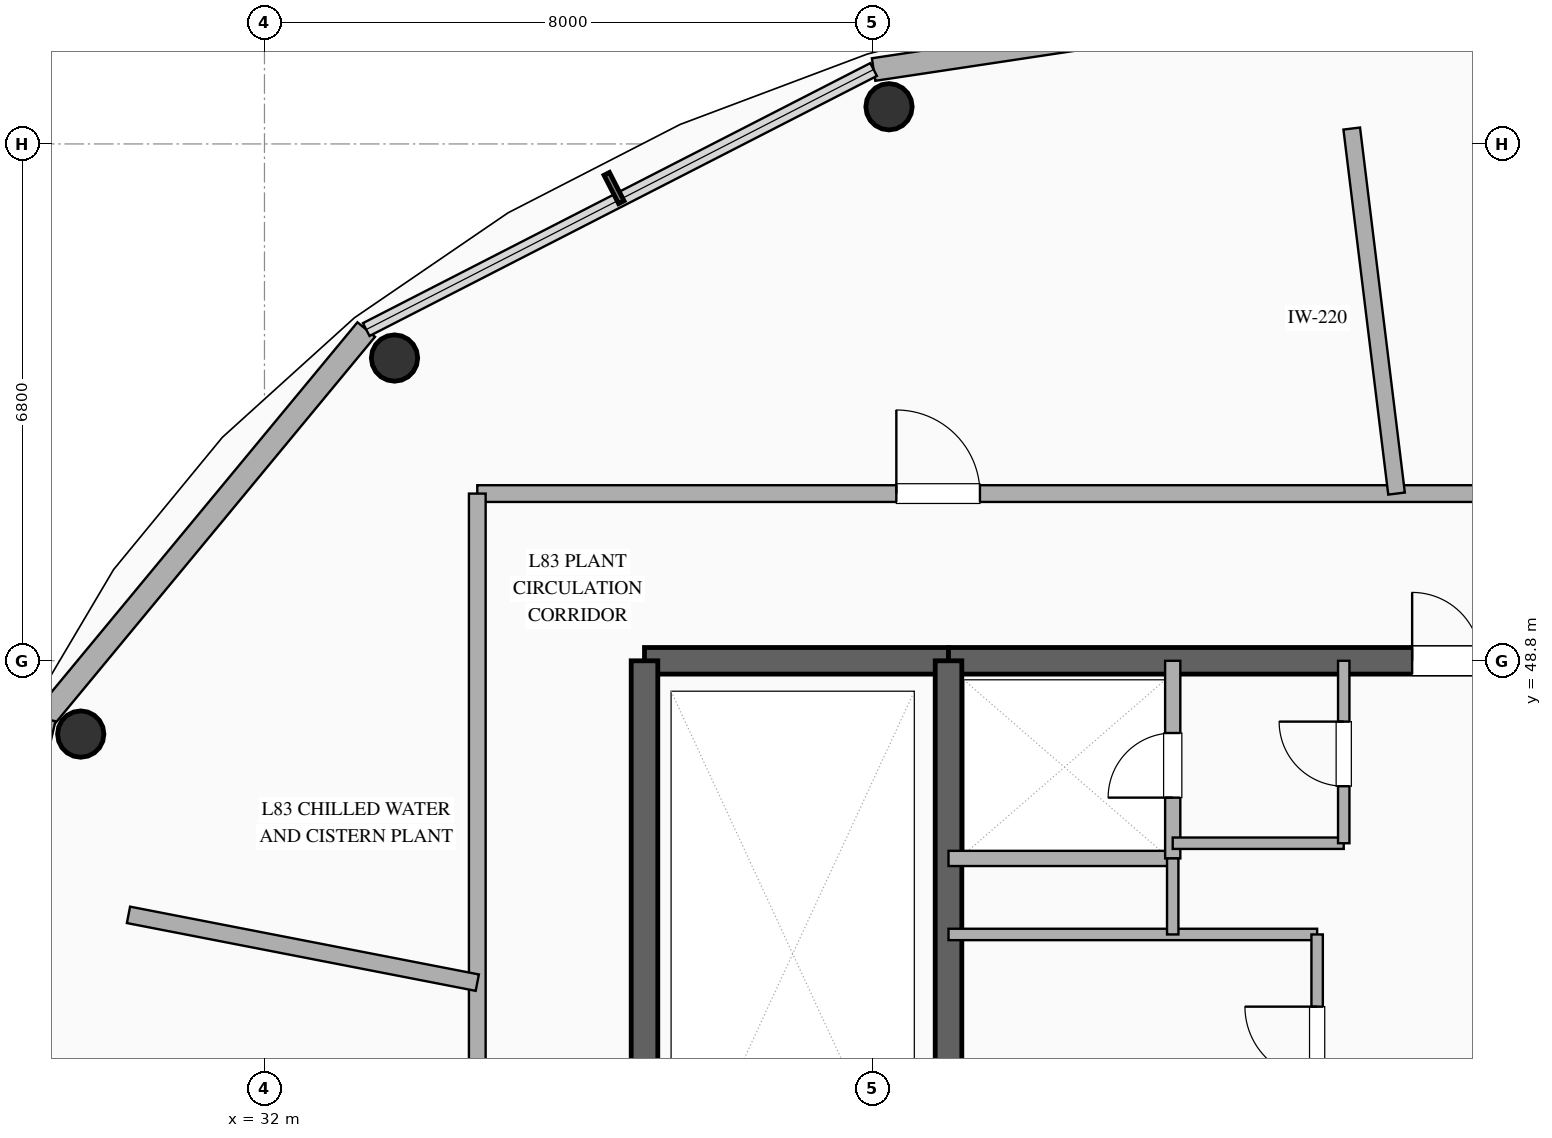
"""IFC4 building model, lengths in metres.
Left out: names, types, materials, properties, quantities, classifications, styles, units other than length and angle.
Written with IfcOpenShell. Run it as: python <this file> out.ifc"""

import sys

from ifc_helpers import new_model, si_unit, direction, frame, frame_2d, origin, origin_2d, place, context, subcontext, project, spatial, rectangle, hollow_circle, extrude, element, fill, save


model = new_model("IFC4")
c1 = context("Model", 3, precision=1e-05, world=origin(), true_north=direction((0.0, 1.0)))
c2 = subcontext(c1, "Body", "Model", "MODEL_VIEW")
j1 = project(units=[si_unit("LENGTHUNIT", "METRE"), si_unit("PLANEANGLEUNIT", "RADIAN")], contexts=[c1])
p1 = place(None, origin())
s1 = spatial("IfcSite", under=j1, at=p1, CompositionType="ELEMENT")
p2 = place(p1, origin())
s2 = spatial("IfcBuilding", under=s1, at=p2, CompositionType="ELEMENT")
p3 = place(p2, frame((0.0, 0.0, 321.6)))
s3 = spatial("IfcBuildingStorey", under=s2, at=p3, CompositionType="ELEMENT", Elevation=321.6)
p4 = place(p3, frame((37.0, 48.8, 0.0), z_axis=(0.0, 0.0, 1.0), x_axis=(1.0, 0.0, 0.0)))
e1 = element("IfcWall", 1, at=p4, inside=s3, PredefinedType="SHEAR", context=c2, shape_type="SweptSolid", body=[
    extrude(rectangle(XDim=4.0, YDim=0.35, at=frame_2d((2.0, 0.0))), origin(), (0.0, 0.0, 1.0), 5.14),
])
p5 = place(p3, frame((41.0, 48.8, 0.0), z_axis=(0.0, 0.0, 1.0), x_axis=(1.0, 0.0, 0.0)))
e2 = element("IfcWall", 2, at=p5, inside=s3, PredefinedType="SHEAR", context=c2, shape_type="SweptSolid", body=[
    extrude(rectangle(XDim=14.0, YDim=0.35, at=frame_2d((7.0, 0.0))), origin(), (0.0, 0.0, 1.0), 5.14),
])
p6 = place(p5, frame((6.1, 0.0, 0.0)))
e3 = element("IfcOpeningElement", 3, at=p6, cuts=e2, PredefinedType="OPENING", context=c2, shape_type="SweptSolid", body=[
    extrude(rectangle(XDim=1.8, YDim=2.25, at=frame_2d((0.9, 1.125))), frame((0.0, 0.185, 0.0), z_axis=(0.0, -1.0, 0.0), x_axis=(1.0, 0.0, 0.0)), (0.0, 0.0, 1.0), 0.37),
])
p7 = place(p3, frame((37.0, 35.2, 0.0), z_axis=(0.0, 0.0, 1.0), x_axis=(0.0, 1.0, 0.0)))
e4 = element("IfcWall", 4, at=p7, inside=s3, PredefinedType="SHEAR", context=c2, shape_type="SweptSolid", body=[
    extrude(rectangle(XDim=13.6, YDim=0.35, at=frame_2d((6.8, 0.0))), origin(), (0.0, 0.0, 1.0), 5.14),
])
p8 = place(p7, frame((1.5, 0.0, 0.0)))
e5 = element("IfcOpeningElement", 5, at=p8, cuts=e4, PredefinedType="OPENING", context=c2, shape_type="SweptSolid", body=[
    extrude(rectangle(XDim=1.2, YDim=2.15, at=frame_2d((0.6, 1.075))), frame((0.0, 0.185, 0.0), z_axis=(0.0, -1.0, 0.0), x_axis=(1.0, 0.0, 0.0)), (0.0, 0.0, 1.0), 0.37),
])
p9 = place(p3, frame((41.0, 35.2, 0.0), z_axis=(0.0, 0.0, 1.0), x_axis=(0.0, 1.0, 0.0)))
e6 = element("IfcWall", 6, at=p9, inside=s3, PredefinedType="SHEAR", context=c2, shape_type="SweptSolid", body=[
    extrude(rectangle(XDim=13.6, YDim=0.35, at=frame_2d((6.8, 0.0))), origin(), (0.0, 0.0, 1.0), 5.14),
])
p10 = place(p9, frame((1.15, 0.0, 0.0)))
e7 = element("IfcOpeningElement", 7, at=p10, cuts=e6, PredefinedType="OPENING", context=c2, shape_type="SweptSolid", body=[
    extrude(rectangle(XDim=1.1, YDim=2.2, at=frame_2d((0.55, 1.1))), frame((0.0, 0.185, 0.0), z_axis=(0.0, -1.0, 0.0), x_axis=(1.0, 0.0, 0.0)), (0.0, 0.0, 1.0), 0.37),
])
for number, where, z_axis, x_axis in (
    (8, (40.217, 56.089, 0.0), (0.0, 0.0, 1.0), (1.0, 0.0, 0.0)),
    (9, (33.711, 52.783, 0.0), (0.0, 0.0, 1.0), (1.0, 0.0, 0.0)),
    (10, (29.583, 47.836, 0.0), (0.0, 0.0, 1.0), (1.0, 0.0, 0.0)),
):
    element("IfcColumn", number, at=place(p3, frame(where, z_axis=z_axis, x_axis=x_axis)), inside=s3, PredefinedType="COLUMN", context=c2, shape_type="SweptSolid", body=[
        extrude(hollow_circle(Radius=0.305, WallThickness=0.02, at=origin_2d()), origin(), (0.0, 0.0, 1.0), 5.14),
    ])
p11 = place(p3, frame((48.0, 57.78, 0.0), z_axis=(0.0, 0.0, 1.0), x_axis=(-0.988875731541, -0.148744033727, 0.0)))
e11 = element("IfcWall", 11, at=p11, inside=s3, PredefinedType="SOLIDWALL", context=c2, shape_type="SweptSolid", body=[
    extrude(rectangle(XDim=8.075, YDim=0.3, at=frame_2d((4.038, 0.0))), origin(), (0.0, 0.0, 1.0), 5.14),
])
p12 = place(p3, frame((33.339, 53.158, 0.0), z_axis=(0.0, 0.0, 1.0), x_axis=(-0.637488001771, -0.770460282947, 0.0)))
e12 = element("IfcWall", 12, at=p12, inside=s3, PredefinedType="SOLIDWALL", context=c2, shape_type="SweptSolid", body=[
    extrude(rectangle(XDim=6.645, YDim=0.3, at=frame_2d((3.322, 0.0))), origin(), (0.0, 0.0, 1.0), 5.14),
])
p13 = place(p3, frame((29.103, 48.039, 0.0), z_axis=(0.0, 0.0, 1.0), x_axis=(-0.225604460723, -0.974218983238, 0.0)))
e13 = element("IfcWall", 13, at=p13, inside=s3, PredefinedType="SOLIDWALL", context=c2, shape_type="SweptSolid", body=[
    extrude(rectangle(XDim=6.199, YDim=0.3, at=frame_2d((3.099, 0.0))), origin(), (0.0, 0.0, 1.0), 5.14),
])
p14 = place(p3, frame((41.0, 46.2, 0.0), z_axis=(0.0, 0.0, 1.0), x_axis=(1.0, 0.0, 0.0)))
e14 = element("IfcWall", 14, at=p14, inside=s3, PredefinedType="SOLIDWALL", context=c2, shape_type="SweptSolid", body=[
    extrude(rectangle(XDim=2.95, YDim=0.2, at=frame_2d((1.475, 0.0))), origin(), (0.0, 0.0, 1.0), 3.74),
])
p15 = place(p3, frame((43.95, 46.2, 0.0), z_axis=(0.0, 0.0, 1.0), x_axis=(0.0, 1.0, 0.0)))
e15 = element("IfcWall", 15, at=p15, inside=s3, PredefinedType="SOLIDWALL", context=c2, shape_type="SweptSolid", body=[
    extrude(rectangle(XDim=2.6, YDim=0.2, at=frame_2d((1.3, 0.0))), origin(), (0.0, 0.0, 1.0), 3.74),
])
p16 = place(p15, frame((0.8, 0.0, 0.0)))
e16 = element("IfcOpeningElement", 16, at=p16, cuts=e15, PredefinedType="OPENING", context=c2, shape_type="SweptSolid", body=[
    extrude(rectangle(XDim=0.85, YDim=2.15, at=frame_2d((0.425, 1.075))), frame((0.0, 0.11, 0.0), z_axis=(0.0, -1.0, 0.0), x_axis=(1.0, 0.0, 0.0)), (0.0, 0.0, 1.0), 0.22),
])
p17 = place(p3, frame((41.0, 45.2, 0.0), z_axis=(0.0, 0.0, 1.0), x_axis=(1.0, 0.0, 0.0)))
e17 = element("IfcWall", 17, at=p17, inside=s3, PredefinedType="PARTITIONING", context=c2, shape_type="SweptSolid", body=[
    extrude(rectangle(XDim=4.85, YDim=0.15, at=frame_2d((2.425, 0.0))), origin(), (0.0, 0.0, 1.0), 3.74),
])
p18 = place(p3, frame((43.95, 45.2, 0.0), z_axis=(0.0, 0.0, 1.0), x_axis=(0.0, 1.0, 0.0)))
e18 = element("IfcWall", 18, at=p18, inside=s3, PredefinedType="PARTITIONING", context=c2, shape_type="SweptSolid", body=[
    extrude(rectangle(XDim=1.0, YDim=0.15, at=frame_2d((0.5, 0.0))), origin(), (0.0, 0.0, 1.0), 3.74),
])
p19 = place(p3, frame((45.85, 42.4, 0.0), z_axis=(0.0, 0.0, 1.0), x_axis=(0.0, 1.0, 0.0)))
e19 = element("IfcWall", 19, at=p19, inside=s3, PredefinedType="PARTITIONING", context=c2, shape_type="SweptSolid", body=[
    extrude(rectangle(XDim=2.8, YDim=0.15, at=frame_2d((1.4, 0.0))), origin(), (0.0, 0.0, 1.0), 3.74),
])
p20 = place(p19, frame((0.9, 0.0, 0.0)))
e20 = element("IfcOpeningElement", 20, at=p20, cuts=e19, PredefinedType="OPENING", context=c2, shape_type="SweptSolid", body=[
    extrude(rectangle(XDim=0.95, YDim=2.15, at=frame_2d((0.475, 1.075))), frame((0.0, 0.085, 0.0), z_axis=(0.0, -1.0, 0.0), x_axis=(1.0, 0.0, 0.0)), (0.0, 0.0, 1.0), 0.17),
])
p21 = place(p3, frame((43.95, 46.4, 0.0), z_axis=(0.0, 0.0, 1.0), x_axis=(1.0, 0.0, 0.0)))
e21 = element("IfcWall", 21, at=p21, inside=s3, PredefinedType="PARTITIONING", context=c2, shape_type="SweptSolid", body=[
    extrude(rectangle(XDim=2.25, YDim=0.15, at=frame_2d((1.125, 0.0))), origin(), (0.0, 0.0, 1.0), 3.74),
])
p22 = place(p3, frame((46.2, 46.4, 0.0), z_axis=(0.0, 0.0, 1.0), x_axis=(0.0, 1.0, 0.0)))
e22 = element("IfcWall", 22, at=p22, inside=s3, PredefinedType="PARTITIONING", context=c2, shape_type="SweptSolid", body=[
    extrude(rectangle(XDim=2.4, YDim=0.15, at=frame_2d((1.2, 0.0))), origin(), (0.0, 0.0, 1.0), 3.74),
])
p23 = place(p22, frame((0.75, 0.0, 0.0)))
e23 = element("IfcOpeningElement", 23, at=p23, cuts=e22, PredefinedType="OPENING", context=c2, shape_type="SweptSolid", body=[
    extrude(rectangle(XDim=0.85, YDim=2.15, at=frame_2d((0.425, 1.075))), frame((0.0, 0.085, 0.0), z_axis=(0.0, -1.0, 0.0), x_axis=(1.0, 0.0, 0.0)), (0.0, 0.0, 1.0), 0.17),
])
p24 = place(p3, frame((34.8, 51.0, 0.0), z_axis=(0.0, 0.0, 1.0), x_axis=(1.0, 0.0, 0.0)))
e24 = element("IfcWall", 24, at=p24, inside=s3, PredefinedType="SOLIDWALL", context=c2, shape_type="SweptSolid", body=[
    extrude(rectangle(XDim=26.4, YDim=0.22, at=frame_2d((13.2, 0.0))), origin(), (0.0, 0.0, 1.0), 3.74),
])
p25 = place(p24, frame((18.681, 0.0, 0.0)))
e25 = element("IfcOpeningElement", 25, at=p25, cuts=e24, PredefinedType="OPENING", context=c2, shape_type="SweptSolid", body=[
    extrude(rectangle(XDim=1.1, YDim=2.15, at=frame_2d((0.55, 1.075))), frame((0.0, 0.12, 0.0), z_axis=(0.0, -1.0, 0.0), x_axis=(1.0, 0.0, 0.0)), (0.0, 0.0, 1.0), 0.24),
])
p26 = place(p24, frame((5.514, 0.0, 0.0)))
e26 = element("IfcOpeningElement", 26, at=p26, cuts=e24, PredefinedType="OPENING", context=c2, shape_type="SweptSolid", body=[
    extrude(rectangle(XDim=1.1, YDim=2.15, at=frame_2d((0.55, 1.075))), frame((0.0, 0.12, 0.0), z_axis=(0.0, -1.0, 0.0), x_axis=(1.0, 0.0, 0.0)), (0.0, 0.0, 1.0), 0.24),
])
p27 = place(p3, frame((34.8, 33.0, 0.0), z_axis=(0.0, 0.0, 1.0), x_axis=(0.0, 1.0, 0.0)))
e27 = element("IfcWall", 27, at=p27, inside=s3, PredefinedType="SOLIDWALL", context=c2, shape_type="SweptSolid", body=[
    extrude(rectangle(XDim=18.0, YDim=0.22, at=frame_2d((9.0, 0.0))), origin(), (0.0, 0.0, 1.0), 3.74),
])
p28 = place(p27, frame((5.249, 0.0, 0.0)))
e28 = element("IfcOpeningElement", 28, at=p28, cuts=e27, PredefinedType="OPENING", context=c2, shape_type="SweptSolid", body=[
    extrude(rectangle(XDim=1.1, YDim=2.15, at=frame_2d((0.55, 1.075))), frame((0.0, 0.12, 0.0), z_axis=(0.0, -1.0, 0.0), x_axis=(1.0, 0.0, 0.0)), (0.0, 0.0, 1.0), 0.24),
])
p29 = place(p3, frame((46.895, 51.0, 0.0), z_axis=(0.0, 0.0, 1.0), x_axis=(-0.121854674678, 0.992547952625, 0.0)))
e29 = element("IfcWall", 29, at=p29, inside=s3, PredefinedType="SOLIDWALL", context=c2, shape_type="SweptSolid", body=[
    extrude(rectangle(XDim=4.839, YDim=0.22, at=frame_2d((2.419, 0.0))), origin(), (0.0, 0.0, 1.0), 3.74),
])
p30 = place(p3, frame((34.8, 44.566, 0.0), z_axis=(0.0, 0.0, 1.0), x_axis=(-0.981634681903, 0.190770415119, 0.0)))
e30 = element("IfcWall", 30, at=p30, inside=s3, PredefinedType="SOLIDWALL", context=c2, shape_type="SweptSolid", body=[
    extrude(rectangle(XDim=4.675, YDim=0.22, at=frame_2d((2.337, 0.0))), origin(), (0.0, 0.0, 1.0), 3.74),
])
p31 = place(p6, origin())
e31 = element("IfcDoor", 31, at=p31, inside=s3, OperationType="DOUBLE_DOOR_SINGLE_SWING", PredefinedType="DOOR", context=c2, shape_type="SweptSolid", body=[
    extrude(rectangle(XDim=1.8, YDim=2.25, at=frame_2d((0.9, 1.125))), frame((0.0, 0.025, 0.0), z_axis=(0.0, -1.0, 0.0), x_axis=(1.0, 0.0, 0.0)), (0.0, 0.0, 1.0), 0.05),
])
fill(e3, e31)
p32 = place(p16, origin())
e32 = element("IfcDoor", 32, at=p32, inside=s3, OperationType="SINGLE_SWING_LEFT", PredefinedType="DOOR", context=c2, shape_type="SweptSolid", body=[
    extrude(rectangle(XDim=0.85, YDim=2.15, at=frame_2d((0.425, 1.075))), frame((0.0, 0.025, 0.0), z_axis=(0.0, -1.0, 0.0), x_axis=(1.0, 0.0, 0.0)), (0.0, 0.0, 1.0), 0.05),
])
fill(e16, e32)
p33 = place(p20, origin())
e33 = element("IfcDoor", 33, at=p33, inside=s3, OperationType="SINGLE_SWING_RIGHT", PredefinedType="DOOR", context=c2, shape_type="SweptSolid", body=[
    extrude(rectangle(XDim=0.95, YDim=2.15, at=frame_2d((0.475, 1.075))), frame((0.0, 0.025, 0.0), z_axis=(0.0, -1.0, 0.0), x_axis=(1.0, 0.0, 0.0)), (0.0, 0.0, 1.0), 0.05),
])
fill(e20, e33)
p34 = place(p23, origin())
e34 = element("IfcDoor", 34, at=p34, inside=s3, OperationType="SINGLE_SWING_RIGHT", PredefinedType="DOOR", context=c2, shape_type="SweptSolid", body=[
    extrude(rectangle(XDim=0.85, YDim=2.15, at=frame_2d((0.425, 1.075))), frame((0.0, 0.025, 0.0), z_axis=(0.0, -1.0, 0.0), x_axis=(1.0, 0.0, 0.0)), (0.0, 0.0, 1.0), 0.05),
])
fill(e23, e34)
p35 = place(p26, origin())
e35 = element("IfcDoor", 35, at=p35, inside=s3, OperationType="SINGLE_SWING_LEFT", PredefinedType="DOOR", context=c2, shape_type="SweptSolid", body=[
    extrude(rectangle(XDim=1.1, YDim=2.15, at=frame_2d((0.55, 1.075))), frame((0.0, 0.025, 0.0), z_axis=(0.0, -1.0, 0.0), x_axis=(1.0, 0.0, 0.0)), (0.0, 0.0, 1.0), 0.05),
])
fill(e26, e35)
save(model, sys.argv[1])
